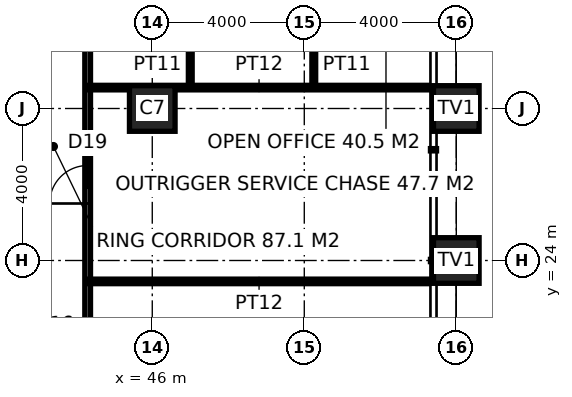
"""IFC4 building model, lengths in metres.
Left out: names, types, materials, properties, quantities, classifications, styles, units other than length and angle.
Written with IfcOpenShell. Run it as: python <this file> out.ifc"""

import sys

from ifc_helpers import new_model, si_unit, direction, frame, frame_2d, origin, origin_2d, place, context, subcontext, project, spatial, rectangle, hollow_rectangle, extrude, element, fill, save


model = new_model("IFC4")
c1 = context("Model", 3, precision=1e-05, world=origin(), true_north=direction((0.0, 1.0)))
c2 = subcontext(c1, "Body", "Model", "MODEL_VIEW")
j1 = project(units=[si_unit("LENGTHUNIT", "METRE"), si_unit("PLANEANGLEUNIT", "RADIAN")], contexts=[c1])
p1 = place(None, origin())
s1 = spatial("IfcSite", under=j1, at=p1, CompositionType="ELEMENT")
p2 = place(p1, origin())
s2 = spatial("IfcBuilding", under=s1, at=p2, CompositionType="ELEMENT")
p3 = place(p2, frame((0.0, 0.0, 43.0)))
s3 = spatial("IfcBuildingStorey", under=s2, at=p3, CompositionType="ELEMENT", Elevation=43.0)
for number, where, z_axis, x_axis in (
    (1, (54.0, 24.0, 0.0), (0.0, 0.0, 1.0), (1.0, 0.0, 0.0)),
    (2, (54.0, 28.0, 0.0), (0.0, 0.0, 1.0), (1.0, 0.0, 0.0)),
):
    element("IfcColumn", number, at=place(p3, frame(where, z_axis=z_axis, x_axis=x_axis)), inside=s3, PredefinedType="USERDEFINED", context=c2, shape_type="SweptSolid", body=[
        extrude(hollow_rectangle(XDim=1.2, YDim=1.2, WallThickness=0.1, at=origin_2d()), origin(), (0.0, 0.0, 1.0), 4.0),
    ])
p4 = place(p3, frame((46.0, 28.0, 0.0), z_axis=(0.0, 0.0, 1.0), x_axis=(1.0, 0.0, 0.0)))
e3 = element("IfcColumn", 3, at=p4, inside=s3, PredefinedType="COLUMN", context=c2, shape_type="SweptSolid", body=[
    extrude(hollow_rectangle(XDim=1.2, YDim=1.2, WallThickness=0.1, at=origin_2d()), origin(), (0.0, 0.0, 1.0), 4.0),
])
p5 = place(p3, frame((44.3, 15.225, 0.0), z_axis=(0.0, 0.0, 1.0), x_axis=(0.0, 1.0, 0.0)))
e4 = element("IfcWall", 4, at=p5, inside=s3, PredefinedType="PARTITIONING", context=c2, shape_type="SweptSolid", body=[
    extrude(rectangle(XDim=23.55, YDim=0.15, at=frame_2d((11.775, 0.0))), origin(), (0.0, 0.0, 1.0), 3.85),
])
p6 = place(p5, frame((2.224, 0.0, 0.0)))
e5 = element("IfcOpeningElement", 5, at=p6, cuts=e4, PredefinedType="OPENING", context=c2, shape_type="SweptSolid", body=[
    extrude(rectangle(XDim=1.8, YDim=2.4, at=frame_2d((0.9, 1.2))), frame((0.0, 0.085, 0.0), z_axis=(0.0, -1.0, 0.0), x_axis=(1.0, 0.0, 0.0)), (0.0, 0.0, 1.0), 0.17),
])
p7 = place(p5, frame((17.475, 0.0, 0.0)))
e6 = element("IfcOpeningElement", 6, at=p7, cuts=e4, PredefinedType="OPENING", context=c2, shape_type="SweptSolid", body=[
    extrude(rectangle(XDim=1.8, YDim=2.4, at=frame_2d((0.9, 1.2))), frame((0.0, 0.085, 0.0), z_axis=(0.0, -1.0, 0.0), x_axis=(1.0, 0.0, 0.0)), (0.0, 0.0, 1.0), 0.17),
])
p8 = place(p5, frame((10.275, 0.0, 0.0)))
e7 = element("IfcOpeningElement", 7, at=p8, cuts=e4, PredefinedType="OPENING", context=c2, shape_type="SweptSolid", body=[
    extrude(rectangle(XDim=1.0, YDim=2.2, at=frame_2d((0.5, 1.1))), frame((0.0, 0.085, 0.0), z_axis=(0.0, -1.0, 0.0), x_axis=(1.0, 0.0, 0.0)), (0.0, 0.0, 1.0), 0.17),
])
for number, where, z_axis, x_axis in (
    (8, (44.3, 23.45, 0.0), (0.0, 0.0, 1.0), (1.0, 0.0, 0.0)),
    (9, (44.3, 28.55, 0.0), (0.0, 0.0, 1.0), (1.0, 0.0, 0.0)),
):
    element("IfcWall", number, at=place(p3, frame(where, z_axis=z_axis, x_axis=x_axis)), inside=s3, PredefinedType="PARTITIONING", context=c2, shape_type="SweptSolid", body=[
        extrude(rectangle(XDim=9.02, YDim=0.12, at=frame_2d((4.51, 0.0))), origin(), (0.0, 0.0, 1.0), 2.65),
    ])
for number, where, z_axis, x_axis in (
    (10, (47.0, 28.61, 0.0), (0.0, 0.0, 1.0), (0.0, 1.0, 0.0)),
    (11, (50.25, 28.61, 0.0), (0.0, 0.0, 1.0), (0.0, 1.0, 0.0)),
):
    element("IfcWall", number, at=place(p3, frame(where, z_axis=z_axis, x_axis=x_axis)), inside=s3, PredefinedType="PARTITIONING", context=c2, shape_type="SweptSolid", body=[
        extrude(rectangle(XDim=3.49, YDim=0.1, at=frame_2d((1.745, 0.0))), origin(), (0.0, 0.0, 1.0), 3.85),
    ])
p9 = place(p8, origin())
e12 = element("IfcDoor", 12, at=p9, inside=s3, OperationType="SINGLE_SWING_LEFT", PredefinedType="DOOR", context=c2, shape_type="SweptSolid", body=[
    extrude(rectangle(XDim=1.0, YDim=2.2, at=frame_2d((0.5, 1.1))), frame((0.0, 0.025, 0.0), z_axis=(0.0, -1.0, 0.0), x_axis=(1.0, 0.0, 0.0)), (0.0, 0.0, 1.0), 0.05),
])
fill(e7, e12)
save(model, sys.argv[1])
